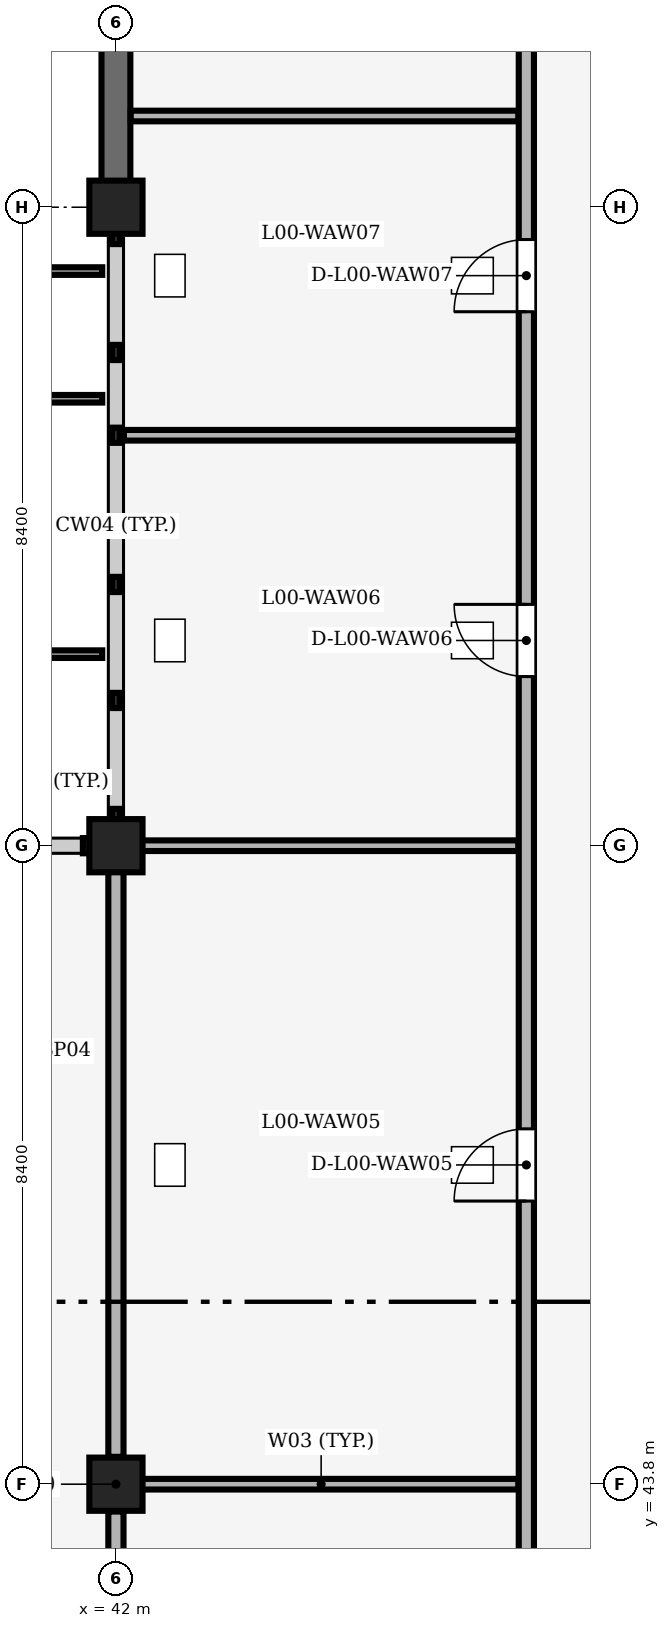
"""IFC4 building model, lengths in metres.
Left out: names, types, materials, properties, quantities, classifications, styles, units other than length and angle.
Written with IfcOpenShell. Run it as: python <this file> out.ifc"""

import sys

from ifc_helpers import new_model, si_unit, direction, frame, frame_2d, origin, origin_2d, place, context, subcontext, project, spatial, rectangle, extrude, element, fill, save


model = new_model("IFC4")
c1 = context("Model", 3, precision=1e-05, world=origin(), true_north=direction((0.0, 1.0)))
c2 = subcontext(c1, "Body", "Model", "MODEL_VIEW")
j1 = project(units=[si_unit("LENGTHUNIT", "METRE"), si_unit("PLANEANGLEUNIT", "RADIAN")], contexts=[c1])
p1 = place(None, origin())
s1 = spatial("IfcSite", under=j1, at=p1, CompositionType="ELEMENT")
p2 = place(p1, origin())
s2 = spatial("IfcBuilding", under=s1, at=p2, CompositionType="ELEMENT")
p3 = place(p2, origin())
s3 = spatial("IfcBuildingStorey", under=s2, at=p3, CompositionType="ELEMENT", Elevation=0.0)
for number, where, z_axis, x_axis in (
    (1, (42.0, 43.8, 0.0), (0.0, 0.0, 1.0), (1.0, 0.0, 0.0)),
    (2, (42.0, 52.2, 0.0), (0.0, 0.0, 1.0), (1.0, 0.0, 0.0)),
    (3, (42.0, 60.6, 0.0), (0.0, 0.0, 1.0), (1.0, 0.0, 0.0)),
):
    element("IfcColumn", number, at=place(p3, frame(where, z_axis=z_axis, x_axis=x_axis)), inside=s3, PredefinedType="COLUMN", context=c2, shape_type="SweptSolid", body=[
        extrude(rectangle(XDim=0.7, YDim=0.7, at=origin_2d()), origin(), (0.0, 0.0, 1.0), 4.8),
    ])
p4 = place(p3, frame((42.0, 60.925, 0.0), z_axis=(0.0, 0.0, 1.0), x_axis=(0.0, 1.0, 0.0)))
e4 = element("IfcWall", 4, at=p4, inside=s3, PredefinedType="SHEAR", context=c2, shape_type="SweptSolid", body=[
    extrude(rectangle(XDim=7.75, YDim=0.38, at=frame_2d((3.875, 0.0))), origin(), (0.0, 0.0, 1.0), 3.952),
])
p5 = place(p3, frame((42.105, 43.8, 0.0), z_axis=(0.0, 0.0, 1.0), x_axis=(1.0, 0.0, 0.0)))
e5 = element("IfcWall", 5, at=p5, inside=s3, PredefinedType="PARTITIONING", context=c2, shape_type="SweptSolid", body=[
    extrude(rectangle(XDim=5.19, YDim=0.14, at=frame_2d((2.595, 0.0))), origin(), (0.0, 0.0, 1.0), 3.71),
])
p6 = place(p3, frame((42.105, 52.2, 0.0), z_axis=(0.0, 0.0, 1.0), x_axis=(1.0, 0.0, 0.0)))
e6 = element("IfcWall", 6, at=p6, inside=s3, PredefinedType="PARTITIONING", context=c2, shape_type="SweptSolid", body=[
    extrude(rectangle(XDim=5.19, YDim=0.14, at=frame_2d((2.595, 0.0))), origin(), (0.0, 0.0, 1.0), 3.91),
])
p7 = place(p3, frame((42.105, 57.6, 0.0), z_axis=(0.0, 0.0, 1.0), x_axis=(1.0, 0.0, 0.0)))
e7 = element("IfcWall", 7, at=p7, inside=s3, PredefinedType="PARTITIONING", context=c2, shape_type="SweptSolid", body=[
    extrude(rectangle(XDim=5.19, YDim=0.14, at=frame_2d((2.595, 0.0))), origin(), (0.0, 0.0, 1.0), 4.11),
])
p8 = place(p3, frame((42.195, 61.8, 0.0), z_axis=(0.0, 0.0, 1.0), x_axis=(1.0, 0.0, 0.0)))
e8 = element("IfcWall", 8, at=p8, inside=s3, PredefinedType="PARTITIONING", context=c2, shape_type="SweptSolid", body=[
    extrude(rectangle(XDim=5.1, YDim=0.14, at=frame_2d((2.55, 0.0))), origin(), (0.0, 0.0, 1.0), 4.5),
])
p9 = place(p3, frame((47.4, 18.165, 0.0), z_axis=(0.0, 0.0, 1.0), x_axis=(0.0, 1.0, 0.0)))
e9 = element("IfcWall", 9, at=p9, inside=s3, PredefinedType="PARTITIONING", context=c2, shape_type="SweptSolid", body=[
    extrude(rectangle(XDim=67.625, YDim=0.2, at=frame_2d((33.812, 0.0))), origin(), (0.0, 0.0, 1.0), 4.5),
])
p10 = place(p9, frame((2.535, 0.0, 0.0)))
e10 = element("IfcOpeningElement", 10, at=p10, cuts=e9, PredefinedType="OPENING", context=c2, shape_type="SweptSolid", body=[
    extrude(rectangle(XDim=1.0, YDim=2.25, at=frame_2d((0.5, 1.125))), frame((0.0, 0.11, 0.0), z_axis=(0.0, -1.0, 0.0), x_axis=(1.0, 0.0, 0.0)), (0.0, 0.0, 1.0), 0.22),
])
p11 = place(p9, frame((6.685, 0.0, 0.0)))
e11 = element("IfcOpeningElement", 11, at=p11, cuts=e9, PredefinedType="OPENING", context=c2, shape_type="SweptSolid", body=[
    extrude(rectangle(XDim=1.5, YDim=2.2, at=frame_2d((0.75, 1.1))), frame((0.0, 0.11, 0.0), z_axis=(0.0, -1.0, 0.0), x_axis=(1.0, 0.0, 0.0)), (0.0, 0.0, 1.0), 0.22),
])
p12 = place(p9, frame((12.535, 0.0, 0.0)))
e12 = element("IfcOpeningElement", 12, at=p12, cuts=e9, PredefinedType="OPENING", context=c2, shape_type="SweptSolid", body=[
    extrude(rectangle(XDim=1.0, YDim=2.15, at=frame_2d((0.5, 1.075))), frame((0.0, 0.11, 0.0), z_axis=(0.0, -1.0, 0.0), x_axis=(1.0, 0.0, 0.0)), (0.0, 0.0, 1.0), 0.22),
])
p13 = place(p9, frame((20.935, 0.0, 0.0)))
e13 = element("IfcOpeningElement", 13, at=p13, cuts=e9, PredefinedType="OPENING", context=c2, shape_type="SweptSolid", body=[
    extrude(rectangle(XDim=1.0, YDim=2.15, at=frame_2d((0.5, 1.075))), frame((0.0, 0.11, 0.0), z_axis=(0.0, -1.0, 0.0), x_axis=(1.0, 0.0, 0.0)), (0.0, 0.0, 1.0), 0.22),
])
p14 = place(p9, frame((29.36, 0.0, 0.0)))
e14 = element("IfcOpeningElement", 14, at=p14, cuts=e9, PredefinedType="OPENING", context=c2, shape_type="SweptSolid", body=[
    extrude(rectangle(XDim=0.95, YDim=2.2, at=frame_2d((0.475, 1.1))), frame((0.0, 0.11, 0.0), z_axis=(0.0, -1.0, 0.0), x_axis=(1.0, 0.0, 0.0)), (0.0, 0.0, 1.0), 0.22),
])
p15 = place(p9, frame((36.26, 0.0, 0.0)))
e15 = element("IfcOpeningElement", 15, at=p15, cuts=e9, PredefinedType="OPENING", context=c2, shape_type="SweptSolid", body=[
    extrude(rectangle(XDim=0.95, YDim=2.2, at=frame_2d((0.475, 1.1))), frame((0.0, 0.11, 0.0), z_axis=(0.0, -1.0, 0.0), x_axis=(1.0, 0.0, 0.0)), (0.0, 0.0, 1.0), 0.22),
])
p16 = place(p9, frame((41.06, 0.0, 0.0)))
e16 = element("IfcOpeningElement", 16, at=p16, cuts=e9, PredefinedType="OPENING", context=c2, shape_type="SweptSolid", body=[
    extrude(rectangle(XDim=0.95, YDim=2.1, at=frame_2d((0.475, 1.05))), frame((0.0, 0.11, 0.0), z_axis=(0.0, -1.0, 0.0), x_axis=(1.0, 0.0, 0.0)), (0.0, 0.0, 1.0), 0.22),
])
p17 = place(p9, frame((49.635, 0.0, 0.0)))
e17 = element("IfcOpeningElement", 17, at=p17, cuts=e9, PredefinedType="OPENING", context=c2, shape_type="SweptSolid", body=[
    extrude(rectangle(XDim=1.2, YDim=2.2, at=frame_2d((0.6, 1.1))), frame((0.0, 0.11, 0.0), z_axis=(0.0, -1.0, 0.0), x_axis=(1.0, 0.0, 0.0)), (0.0, 0.0, 1.0), 0.22),
])
p18 = place(p9, frame((61.735, 0.0, 0.0)))
e18 = element("IfcOpeningElement", 18, at=p18, cuts=e9, PredefinedType="OPENING", context=c2, shape_type="SweptSolid", body=[
    extrude(rectangle(XDim=1.0, YDim=2.25, at=frame_2d((0.5, 1.125))), frame((0.0, 0.11, 0.0), z_axis=(0.0, -1.0, 0.0), x_axis=(1.0, 0.0, 0.0)), (0.0, 0.0, 1.0), 0.22),
])
p19 = place(p3, frame((42.0, 35.76, 0.0), z_axis=(0.0, 0.0, 1.0), x_axis=(0.0, 1.0, 0.0)))
e19 = element("IfcWall", 19, at=p19, inside=s3, PredefinedType="PARTITIONING", context=c2, shape_type="SweptSolid", body=[
    extrude(rectangle(XDim=7.68, YDim=0.2, at=frame_2d((3.84, 0.0))), origin(), (0.0, 0.0, 1.0), 3.912),
])
p20 = place(p19, frame((3.34, 0.0, 0.0)))
e20 = element("IfcOpeningElement", 20, at=p20, cuts=e19, PredefinedType="OPENING", context=c2, shape_type="SweptSolid", body=[
    extrude(rectangle(XDim=1.0, YDim=2.15, at=frame_2d((0.5, 1.075))), frame((0.0, 0.11, 0.0), z_axis=(0.0, -1.0, 0.0), x_axis=(1.0, 0.0, 0.0)), (0.0, 0.0, 1.0), 0.22),
])
p21 = place(p3, frame((42.0, 44.16, 0.0), z_axis=(0.0, 0.0, 1.0), x_axis=(0.0, 1.0, 0.0)))
e21 = element("IfcWall", 21, at=p21, inside=s3, PredefinedType="PARTITIONING", context=c2, shape_type="SweptSolid", body=[
    extrude(rectangle(XDim=7.935, YDim=0.2, at=frame_2d((3.968, 0.0))), origin(), (0.0, 0.0, 1.0), 3.912),
])
p22 = place(p14, origin())
e22 = element("IfcDoor", 22, at=p22, inside=s3, OperationType="SINGLE_SWING_LEFT", PredefinedType="DOOR", context=c2, shape_type="SweptSolid", body=[
    extrude(rectangle(XDim=0.95, YDim=2.2, at=frame_2d((0.475, 1.1))), frame((0.0, 0.025, 0.0), z_axis=(0.0, -1.0, 0.0), x_axis=(1.0, 0.0, 0.0)), (0.0, 0.0, 1.0), 0.05),
])
fill(e14, e22)
p23 = place(p15, origin())
e23 = element("IfcDoor", 23, at=p23, inside=s3, OperationType="SINGLE_SWING_RIGHT", PredefinedType="DOOR", context=c2, shape_type="SweptSolid", body=[
    extrude(rectangle(XDim=0.95, YDim=2.2, at=frame_2d((0.475, 1.1))), frame((0.0, 0.025, 0.0), z_axis=(0.0, -1.0, 0.0), x_axis=(1.0, 0.0, 0.0)), (0.0, 0.0, 1.0), 0.05),
])
fill(e15, e23)
p24 = place(p16, origin())
e24 = element("IfcDoor", 24, at=p24, inside=s3, OperationType="SINGLE_SWING_LEFT", PredefinedType="DOOR", context=c2, shape_type="SweptSolid", body=[
    extrude(rectangle(XDim=0.95, YDim=2.1, at=frame_2d((0.475, 1.05))), frame((0.0, 0.025, 0.0), z_axis=(0.0, -1.0, 0.0), x_axis=(1.0, 0.0, 0.0)), (0.0, 0.0, 1.0), 0.05),
])
fill(e16, e24)
save(model, sys.argv[1])
